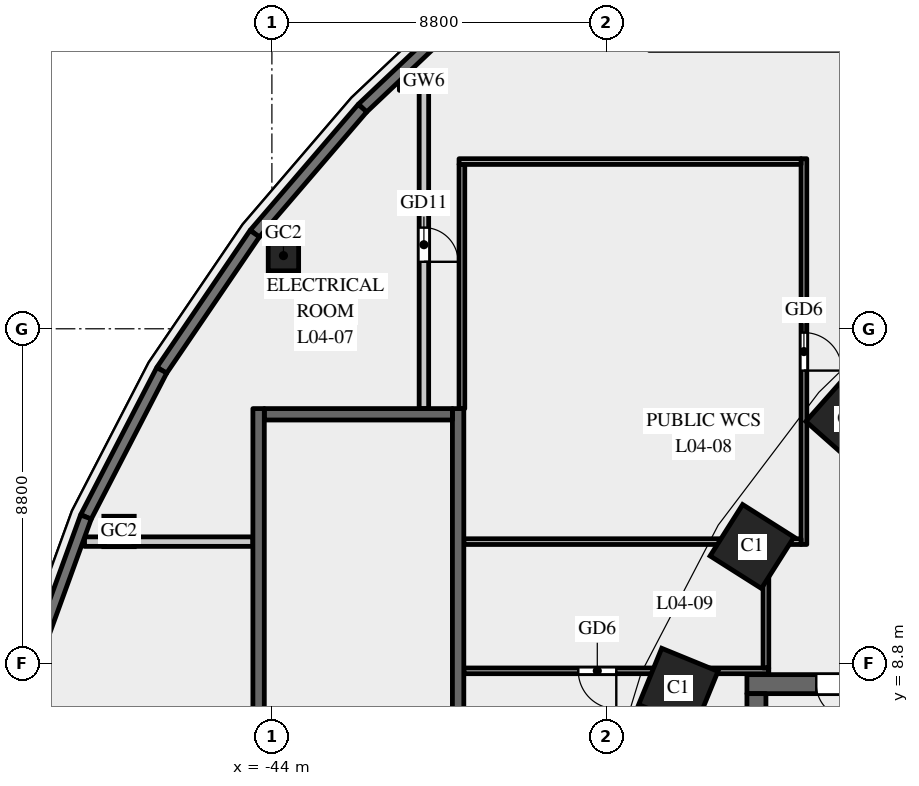
"""IFC4 building model, lengths in metres.
Left out: names, types, materials, properties, quantities, classifications, styles, units other than length and angle.
Written with IfcOpenShell. Run it as: python <this file> out.ifc"""

import sys

from ifc_helpers import new_model, si_unit, direction, frame, frame_2d, origin, origin_2d, place, context, subcontext, project, spatial, rectangle, hollow_rectangle, extrude, element, fill, save


model = new_model("IFC4")
c1 = context("Model", 3, precision=1e-05, world=origin(), true_north=direction((0.0, 1.0)))
c2 = subcontext(c1, "Body", "Model", "MODEL_VIEW")
j1 = project(units=[si_unit("LENGTHUNIT", "METRE"), si_unit("PLANEANGLEUNIT", "RADIAN")], contexts=[c1])
p1 = place(None, origin())
s1 = spatial("IfcSite", under=j1, at=p1, CompositionType="ELEMENT")
p2 = place(p1, origin())
s2 = spatial("IfcBuilding", under=s1, at=p2, CompositionType="ELEMENT")
p3 = place(p2, frame((0.0, 0.0, 25.0)))
s3 = spatial("IfcBuildingStorey", under=s2, at=p3, CompositionType="ELEMENT", Elevation=25.0)
for number, where, z_axis, x_axis in (
    (1, (-28.819, 15.23, 0.0), (0.0, 0.0, 1.0), (-0.663, -0.749, 0.0)),
    (2, (-31.365, 11.871, 0.0), (0.0, 0.0, 1.0), (-0.535, -0.845, 0.0)),
    (3, (-33.305, 8.149, 0.0), (0.0, 0.0, 1.0), (-0.379, -0.925, 0.0)),
):
    element("IfcColumn", number, at=place(p3, frame(where, z_axis=z_axis, x_axis=x_axis)), inside=s3, PredefinedType="COLUMN", context=c2, shape_type="SweptSolid", body=[
        extrude(rectangle(XDim=1.6, YDim=1.6, at=origin_2d()), origin(), (0.0, 0.0, 1.0), 5.5),
    ])
p4 = place(p3, frame((-16.5, 8.25, 0.0), z_axis=(0.0, 0.0, 1.0), x_axis=(-1.0, 0.0, 0.0)))
e4 = element("IfcWall", 4, at=p4, inside=s3, PredefinedType="SHEAR", context=c2, shape_type="SweptSolid", body=[
    extrude(rectangle(XDim=15.0, YDim=0.5, at=frame_2d((7.5, 0.0))), origin(), (0.0, 0.0, 1.0), 5.2),
])
p5 = place(p4, frame((6.9, 0.0, 0.0)))
e5 = element("IfcOpeningElement", 5, at=p5, cuts=e4, PredefinedType="OPENING", context=c2, shape_type="SweptSolid", body=[
    extrude(rectangle(XDim=1.2, YDim=2.1, at=frame_2d((0.6, 1.05))), frame((0.0, 0.26, 0.0), z_axis=(0.0, -1.0, 0.0), x_axis=(1.0, 0.0, 0.0)), (0.0, 0.0, 1.0), 0.52),
])
p6 = place(p4, frame((12.275, 0.0, 0.0)))
e6 = element("IfcOpeningElement", 6, at=p6, cuts=e4, PredefinedType="OPENING", context=c2, shape_type="SweptSolid", body=[
    extrude(rectangle(XDim=0.9, YDim=2.1, at=frame_2d((0.45, 1.05))), frame((0.0, 0.26, 0.0), z_axis=(0.0, -1.0, 0.0), x_axis=(1.0, 0.0, 0.0)), (0.0, 0.0, 1.0), 0.52),
])
p7 = place(p3, frame((-31.25, -8.0, 0.0), z_axis=(0.0, 0.0, 1.0), x_axis=(0.0, 1.0, 0.0)))
e7 = element("IfcWall", 7, at=p7, inside=s3, PredefinedType="SHEAR", context=c2, shape_type="SweptSolid", body=[
    extrude(rectangle(XDim=16.0, YDim=0.5, at=frame_2d((8.0, 0.0))), origin(), (0.0, 0.0, 1.0), 5.2),
])
for number, where, z_axis, x_axis in (
    (8, (-43.696, 19.525, 0.0), (0.0, 0.0, 1.0), (1.0, 0.0, 0.0)),
    (9, (-48.022, 12.267, 0.0), (0.0, 0.0, 1.0), (1.0, 0.0, 0.0)),
):
    element("IfcColumn", number, at=place(p3, frame(where, z_axis=z_axis, x_axis=x_axis)), inside=s3, PredefinedType="COLUMN", context=c2, shape_type="SweptSolid", body=[
        extrude(hollow_rectangle(XDim=0.8, YDim=0.8, WallThickness=0.04, at=origin_2d()), origin(), (0.0, 0.0, 1.0), 5.488),
    ])
p8 = place(p3, frame((-44.5, 12.0, 0.0), z_axis=(0.0, 0.0, 1.0), x_axis=(-1.0, 0.0, 0.0)))
e10 = element("IfcWall", 10, at=p8, inside=s3, PredefinedType="PARTITIONING", context=c2, shape_type="SweptSolid", body=[
    extrude(rectangle(XDim=4.43, YDim=0.25, at=frame_2d((2.215, 0.0))), origin(), (0.0, 0.0, 1.0), 4.2),
])
p9 = place(p3, frame((-40.646, 24.0, 0.0), z_axis=(0.0, 0.0, 1.0), x_axis=(1.0, 0.0, 0.0)))
e11 = element("IfcWall", 11, at=p9, inside=s3, PredefinedType="PARTITIONING", context=c2, shape_type="SweptSolid", body=[
    extrude(rectangle(XDim=0.521, YDim=0.25, at=frame_2d((0.26, 0.0))), origin(), (0.0, 0.0, 1.0), 5.2),
])
p10 = place(p3, frame((-40.0, 24.125, 0.0), z_axis=(0.0, 0.0, 1.0), x_axis=(0.0, -1.0, 0.0)))
e12 = element("IfcWall", 12, at=p10, inside=s3, PredefinedType="PARTITIONING", context=c2, shape_type="SweptSolid", body=[
    extrude(rectangle(XDim=8.625, YDim=0.25, at=frame_2d((4.312, 0.0))), origin(), (0.0, 0.0, 1.0), 4.2),
])
p11 = place(p10, frame((3.863, 0.0, 0.0)))
e13 = element("IfcOpeningElement", 13, at=p11, cuts=e12, PredefinedType="OPENING", context=c2, shape_type="SweptSolid", body=[
    extrude(rectangle(XDim=0.9, YDim=2.1, at=frame_2d((0.45, 1.05))), frame((0.0, 0.135, 0.0), z_axis=(0.0, -1.0, 0.0), x_axis=(1.0, 0.0, 0.0)), (0.0, 0.0, 1.0), 0.27),
])
p12 = place(p3, frame((-31.065, 12.0, 0.0), z_axis=(0.0, 0.0, 1.0), x_axis=(-1.0, 0.0, 0.0)))
e14 = element("IfcWall", 14, at=p12, inside=s3, PredefinedType="PARTITIONING", context=c2, shape_type="SweptSolid", body=[
    extrude(rectangle(XDim=7.885, YDim=0.15, at=frame_2d((3.942, 0.0))), origin(), (0.0, 0.0, 1.0), 5.2),
])
p13 = place(p3, frame((-30.0, 22.075, 0.0), z_axis=(0.0, 0.0, 1.0), x_axis=(0.0, -1.0, 0.0)))
e15 = element("IfcWall", 15, at=p13, inside=s3, PredefinedType="PARTITIONING", context=c2, shape_type="SweptSolid", body=[
    extrude(rectangle(XDim=10.15, YDim=0.15, at=frame_2d((5.075, 0.0))), origin(), (0.0, 0.0, 1.0), 4.2),
])
p14 = place(p13, frame((4.575, 0.0, 0.0)))
e16 = element("IfcOpeningElement", 16, at=p14, cuts=e15, PredefinedType="OPENING", context=c2, shape_type="SweptSolid", body=[
    extrude(rectangle(XDim=1.0, YDim=2.1, at=frame_2d((0.5, 1.05))), frame((0.0, 0.085, 0.0), z_axis=(0.0, -1.0, 0.0), x_axis=(1.0, 0.0, 0.0)), (0.0, 0.0, 1.0), 0.17),
])
p15 = place(p3, frame((-30.075, 12.0, 0.0), z_axis=(0.0, 0.0, 1.0), x_axis=(-1.0, 0.0, 0.0)))
e17 = element("IfcWall", 17, at=p15, inside=s3, PredefinedType="PARTITIONING", context=c2, shape_type="SweptSolid", body=[
    extrude(rectangle(XDim=0.86, YDim=0.15, at=frame_2d((0.43, 0.0))), origin(), (0.0, 0.0, 1.0), 5.2),
])
p16 = place(p3, frame((-39.0, 15.5, 0.0), z_axis=(0.0, 0.0, 1.0), x_axis=(0.0, 1.0, 0.0)))
e18 = element("IfcWall", 18, at=p16, inside=s3, PredefinedType="PARTITIONING", context=c2, shape_type="SweptSolid", body=[
    extrude(rectangle(XDim=6.425, YDim=0.15, at=frame_2d((3.212, 0.0))), origin(), (0.0, 0.0, 1.0), 4.2),
])
p17 = place(p3, frame((-39.075, 22.0, 0.0), z_axis=(0.0, 0.0, 1.0), x_axis=(1.0, 0.0, 0.0)))
e19 = element("IfcWall", 19, at=p17, inside=s3, PredefinedType="PARTITIONING", context=c2, shape_type="SweptSolid", body=[
    extrude(rectangle(XDim=9.0, YDim=0.15, at=frame_2d((4.5, 0.0))), origin(), (0.0, 0.0, 1.0), 4.2),
])
p18 = place(p3, frame((-30.925, 8.6, 0.0), z_axis=(0.0, 0.0, 1.0), x_axis=(-1.0, 0.0, 0.0)))
e20 = element("IfcWall", 20, at=p18, inside=s3, PredefinedType="PARTITIONING", context=c2, shape_type="SweptSolid", body=[
    extrude(rectangle(XDim=8.025, YDim=0.15, at=frame_2d((4.012, 0.0))), origin(), (0.0, 0.0, 1.0), 4.2),
])
p19 = place(p18, frame((4.012, 0.0, 0.0)))
e21 = element("IfcOpeningElement", 21, at=p19, cuts=e20, PredefinedType="OPENING", context=c2, shape_type="SweptSolid", body=[
    extrude(rectangle(XDim=1.0, YDim=2.1, at=frame_2d((0.5, 1.05))), frame((0.0, 0.085, 0.0), z_axis=(0.0, -1.0, 0.0), x_axis=(1.0, 0.0, 0.0)), (0.0, 0.0, 1.0), 0.17),
])
p20 = place(p3, frame((-31.0, 11.925, 0.0), z_axis=(0.0, 0.0, 1.0), x_axis=(0.0, -1.0, 0.0)))
e22 = element("IfcWall", 22, at=p20, inside=s3, PredefinedType="PARTITIONING", context=c2, shape_type="SweptSolid", body=[
    extrude(rectangle(XDim=3.25, YDim=0.15, at=frame_2d((1.625, 0.0))), origin(), (0.0, 0.0, 1.0), 5.2),
])
p21 = place(p3, frame((-38.453, 26.401, 0.0), z_axis=(0.0, 0.0, 1.0), x_axis=(-0.72620446032, -0.687478786444, 0.0)))
e23 = element("IfcWall", 23, at=p21, inside=s3, PredefinedType="SOLIDWALL", context=c2, shape_type="SweptSolid", body=[
    extrude(rectangle(XDim=4.356, YDim=0.3, at=frame_2d((2.178, 0.0))), origin(), (0.0, 0.0, 1.0), 5.2),
])
p22 = place(p21, frame((0.608, 0.0, 1.0)))
e24 = element("IfcOpeningElement", 24, at=p22, cuts=e23, PredefinedType="OPENING", context=c2, shape_type="SweptSolid", body=[
    extrude(rectangle(XDim=2.4, YDim=3.0, at=frame_2d((1.2, 1.5))), frame((0.0, 0.16, 0.0), z_axis=(0.0, -1.0, 0.0), x_axis=(1.0, 0.0, 0.0)), (0.0, 0.0, 1.0), 0.32),
])
p23 = place(p3, frame((-41.617, 23.406, 0.0), z_axis=(0.0, 0.0, 1.0), x_axis=(-0.651387059497, -0.758745608699, 0.0)))
e25 = element("IfcWall", 25, at=p23, inside=s3, PredefinedType="SOLIDWALL", context=c2, shape_type="SweptSolid", body=[
    extrude(rectangle(XDim=4.353, YDim=0.3, at=frame_2d((2.176, 0.0))), origin(), (0.0, 0.0, 1.0), 5.2),
])
p24 = place(p23, frame((0.976, 0.0, 1.0)))
e26 = element("IfcOpeningElement", 26, at=p24, cuts=e25, PredefinedType="OPENING", context=c2, shape_type="SweptSolid", body=[
    extrude(rectangle(XDim=2.4, YDim=3.0, at=frame_2d((1.2, 1.5))), frame((0.0, 0.16, 0.0), z_axis=(0.0, -1.0, 0.0), x_axis=(1.0, 0.0, 0.0)), (0.0, 0.0, 1.0), 0.32),
])
p25 = place(p3, frame((-44.452, 20.104, 0.0), z_axis=(0.0, 0.0, 1.0), x_axis=(-0.562667738859, -0.82668314102, 0.0)))
e27 = element("IfcWall", 27, at=p25, inside=s3, PredefinedType="SOLIDWALL", context=c2, shape_type="SweptSolid", body=[
    extrude(rectangle(XDim=4.349, YDim=0.3, at=frame_2d((2.174, 0.0))), origin(), (0.0, 0.0, 1.0), 5.2),
])
p26 = place(p25, frame((0.974, 0.0, 1.0)))
e28 = element("IfcOpeningElement", 28, at=p26, cuts=e27, PredefinedType="OPENING", context=c2, shape_type="SweptSolid", body=[
    extrude(rectangle(XDim=2.4, YDim=3.0, at=frame_2d((1.2, 1.5))), frame((0.0, 0.16, 0.0), z_axis=(0.0, -1.0, 0.0), x_axis=(1.0, 0.0, 0.0)), (0.0, 0.0, 1.0), 0.32),
])
p27 = place(p3, frame((-46.899, 16.508, 0.0), z_axis=(0.0, 0.0, 1.0), x_axis=(-0.459242531468, -0.888310923771, 0.0)))
e29 = element("IfcWall", 29, at=p27, inside=s3, PredefinedType="SOLIDWALL", context=c2, shape_type="SweptSolid", body=[
    extrude(rectangle(XDim=4.345, YDim=0.3, at=frame_2d((2.172, 0.0))), origin(), (0.0, 0.0, 1.0), 5.2),
])
p28 = place(p27, frame((0.972, 0.0, 1.0)))
e30 = element("IfcOpeningElement", 30, at=p28, cuts=e29, PredefinedType="OPENING", context=c2, shape_type="SweptSolid", body=[
    extrude(rectangle(XDim=2.4, YDim=3.0, at=frame_2d((1.2, 1.5))), frame((0.0, 0.16, 0.0), z_axis=(0.0, -1.0, 0.0), x_axis=(1.0, 0.0, 0.0)), (0.0, 0.0, 1.0), 0.32),
])
p29 = place(p3, frame((-48.894, 12.649, 0.0), z_axis=(0.0, 0.0, 1.0), x_axis=(-0.341286990045, -0.939959142956, 0.0)))
e31 = element("IfcWall", 31, at=p29, inside=s3, PredefinedType="SOLIDWALL", context=c2, shape_type="SweptSolid", body=[
    extrude(rectangle(XDim=4.342, YDim=0.3, at=frame_2d((2.171, 0.0))), origin(), (0.0, 0.0, 1.0), 5.2),
])
p30 = place(p29, frame((0.971, 0.0, 1.0)))
e32 = element("IfcOpeningElement", 32, at=p30, cuts=e31, PredefinedType="OPENING", context=c2, shape_type="SweptSolid", body=[
    extrude(rectangle(XDim=2.4, YDim=3.0, at=frame_2d((1.2, 1.5))), frame((0.0, 0.16, 0.0), z_axis=(0.0, -1.0, 0.0), x_axis=(1.0, 0.0, 0.0)), (0.0, 0.0, 1.0), 0.32),
])
for number, where, z_axis, x_axis in (
    (33, (-44.35, 4.5, 0.0), (0.0, 0.0, 1.0), (0.0, 1.0, 0.0)),
    (34, (-39.1, 4.5, 0.0), (0.0, 0.0, 1.0), (0.0, 1.0, 0.0)),
):
    element("IfcWall", number, at=place(p3, frame(where, z_axis=z_axis, x_axis=x_axis)), inside=s3, PredefinedType="SHEAR", context=c2, shape_type="SweptSolid", body=[
        extrude(rectangle(XDim=11.0, YDim=0.3, at=frame_2d((5.5, 0.0))), origin(), (0.0, 0.0, 1.0), 5.2),
    ])
p31 = place(p3, frame((-44.2, 15.35, 0.0), z_axis=(0.0, 0.0, 1.0), x_axis=(1.0, 0.0, 0.0)))
e35 = element("IfcWall", 35, at=p31, inside=s3, PredefinedType="SHEAR", context=c2, shape_type="SweptSolid", body=[
    extrude(rectangle(XDim=4.95, YDim=0.3, at=frame_2d((2.475, 0.0))), origin(), (0.0, 0.0, 1.0), 5.2),
])
p32 = place(p6, origin())
e36 = element("IfcDoor", 36, at=p32, inside=s3, OperationType="SINGLE_SWING_RIGHT", PredefinedType="DOOR", context=c2, shape_type="SweptSolid", body=[
    extrude(rectangle(XDim=0.9, YDim=2.1, at=frame_2d((0.45, 1.05))), frame((0.0, 0.025, 0.0), z_axis=(0.0, -1.0, 0.0), x_axis=(1.0, 0.0, 0.0)), (0.0, 0.0, 1.0), 0.05),
])
fill(e6, e36)
p33 = place(p11, origin())
e37 = element("IfcDoor", 37, at=p33, inside=s3, OperationType="SINGLE_SWING_RIGHT", PredefinedType="DOOR", context=c2, shape_type="SweptSolid", body=[
    extrude(rectangle(XDim=0.9, YDim=2.1, at=frame_2d((0.45, 1.05))), frame((0.0, 0.025, 0.0), z_axis=(0.0, -1.0, 0.0), x_axis=(1.0, 0.0, 0.0)), (0.0, 0.0, 1.0), 0.05),
])
fill(e13, e37)
p34 = place(p14, origin())
e38 = element("IfcDoor", 38, at=p34, inside=s3, OperationType="SINGLE_SWING_RIGHT", PredefinedType="DOOR", context=c2, shape_type="SweptSolid", body=[
    extrude(rectangle(XDim=1.0, YDim=2.1, at=frame_2d((0.5, 1.05))), frame((0.0, 0.025, 0.0), z_axis=(0.0, -1.0, 0.0), x_axis=(1.0, 0.0, 0.0)), (0.0, 0.0, 1.0), 0.05),
])
fill(e16, e38)
p35 = place(p19, origin())
e39 = element("IfcDoor", 39, at=p35, inside=s3, OperationType="SINGLE_SWING_LEFT", PredefinedType="DOOR", context=c2, shape_type="SweptSolid", body=[
    extrude(rectangle(XDim=1.0, YDim=2.1, at=frame_2d((0.5, 1.05))), frame((0.0, 0.025, 0.0), z_axis=(0.0, -1.0, 0.0), x_axis=(1.0, 0.0, 0.0)), (0.0, 0.0, 1.0), 0.05),
])
fill(e21, e39)
p36 = place(p22, origin())
e40 = element("IfcWindow", 40, at=p36, inside=s3, PartitioningType="SINGLE_PANEL", PredefinedType="WINDOW", context=c2, shape_type="SweptSolid", body=[
    extrude(rectangle(XDim=2.4, YDim=3.0, at=frame_2d((1.2, 1.5))), frame((0.0, 0.03, 0.0), z_axis=(0.0, -1.0, 0.0), x_axis=(1.0, 0.0, 0.0)), (0.0, 0.0, 1.0), 0.06),
])
fill(e24, e40)
p37 = place(p24, origin())
e41 = element("IfcWindow", 41, at=p37, inside=s3, PartitioningType="SINGLE_PANEL", PredefinedType="WINDOW", context=c2, shape_type="SweptSolid", body=[
    extrude(rectangle(XDim=2.4, YDim=3.0, at=frame_2d((1.2, 1.5))), frame((0.0, 0.03, 0.0), z_axis=(0.0, -1.0, 0.0), x_axis=(1.0, 0.0, 0.0)), (0.0, 0.0, 1.0), 0.06),
])
fill(e26, e41)
p38 = place(p26, origin())
e42 = element("IfcWindow", 42, at=p38, inside=s3, PartitioningType="SINGLE_PANEL", PredefinedType="WINDOW", context=c2, shape_type="SweptSolid", body=[
    extrude(rectangle(XDim=2.4, YDim=3.0, at=frame_2d((1.2, 1.5))), frame((0.0, 0.03, 0.0), z_axis=(0.0, -1.0, 0.0), x_axis=(1.0, 0.0, 0.0)), (0.0, 0.0, 1.0), 0.06),
])
fill(e28, e42)
p39 = place(p28, origin())
e43 = element("IfcWindow", 43, at=p39, inside=s3, PartitioningType="SINGLE_PANEL", PredefinedType="WINDOW", context=c2, shape_type="SweptSolid", body=[
    extrude(rectangle(XDim=2.4, YDim=3.0, at=frame_2d((1.2, 1.5))), frame((0.0, 0.03, 0.0), z_axis=(0.0, -1.0, 0.0), x_axis=(1.0, 0.0, 0.0)), (0.0, 0.0, 1.0), 0.06),
])
fill(e30, e43)
p40 = place(p30, origin())
e44 = element("IfcWindow", 44, at=p40, inside=s3, PartitioningType="SINGLE_PANEL", PredefinedType="WINDOW", context=c2, shape_type="SweptSolid", body=[
    extrude(rectangle(XDim=2.4, YDim=3.0, at=frame_2d((1.2, 1.5))), frame((0.0, 0.03, 0.0), z_axis=(0.0, -1.0, 0.0), x_axis=(1.0, 0.0, 0.0)), (0.0, 0.0, 1.0), 0.06),
])
fill(e32, e44)
save(model, sys.argv[1])
